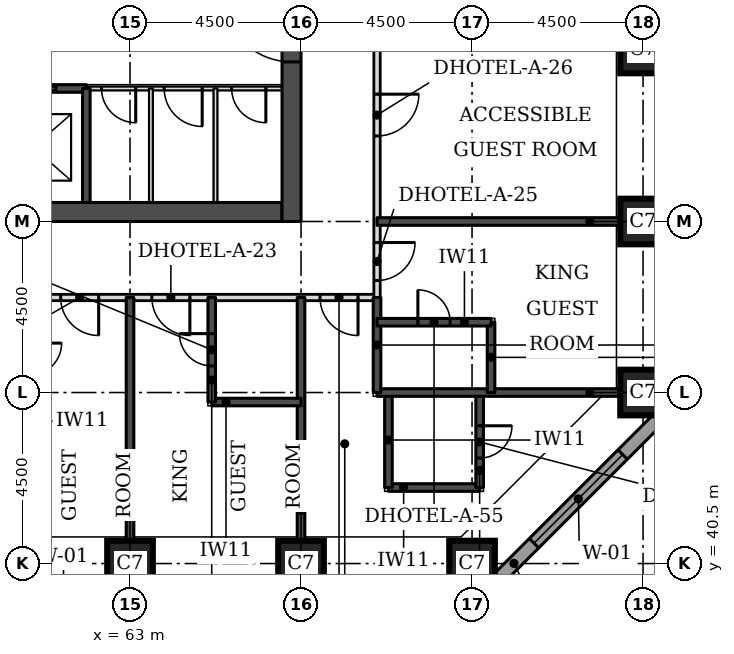
"""IFC4 building model, lengths in metres.
Left out: names, types, materials, properties, quantities, classifications, styles, units other than length and angle.
Written with IfcOpenShell. Run it as: python <this file> out.ifc"""

import sys

from ifc_helpers import new_model, si_unit, direction, frame, frame_2d, origin, origin_2d, place, context, subcontext, project, spatial, rectangle, extrude, element, fill, save


model = new_model("IFC4")
c1 = context("Model", 3, precision=1e-05, world=origin(), true_north=direction((0.0, 1.0)))
c2 = subcontext(c1, "Body", "Model", "MODEL_VIEW")
j1 = project(units=[si_unit("LENGTHUNIT", "METRE"), si_unit("PLANEANGLEUNIT", "RADIAN")], contexts=[c1])
p1 = place(None, origin())
s1 = spatial("IfcSite", under=j1, at=p1, CompositionType="ELEMENT")
p2 = place(p1, origin())
s2 = spatial("IfcBuilding", under=s1, at=p2, CompositionType="ELEMENT")
p3 = place(p2, frame((0.0, 0.0, 26.4)))
s3 = spatial("IfcBuildingStorey", under=s2, at=p3, CompositionType="ELEMENT", Elevation=26.4)
for number, where, z_axis, x_axis in (
    (1, (63.0, 40.5, 0.0), (0.0, 0.0, 1.0), (1.0, 0.0, 0.0)),
    (2, (67.5, 40.5, 0.0), (0.0, 0.0, 1.0), (1.0, 0.0, 0.0)),
    (3, (72.0, 40.5, 0.0), (0.0, 0.0, 1.0), (1.0, 0.0, 0.0)),
    (4, (76.5, 45.0, 0.0), (0.0, 0.0, 1.0), (1.0, 0.0, 0.0)),
    (5, (76.5, 49.5, 0.0), (0.0, 0.0, 1.0), (1.0, 0.0, 0.0)),
    (6, (76.5, 54.0, 0.0), (0.0, 0.0, 1.0), (1.0, 0.0, 0.0)),
):
    element("IfcColumn", number, at=place(p3, frame(where, z_axis=z_axis, x_axis=x_axis)), inside=s3, PredefinedType="COLUMN", context=c2, shape_type="SweptSolid", body=[
        extrude(rectangle(XDim=1.2, YDim=1.2, at=origin_2d()), origin(), (0.0, 0.0, 1.0), 3.3),
    ])
p4 = place(p3, frame((45.5, 49.75, 0.0), z_axis=(0.0, 0.0, 1.0), x_axis=(1.0, 0.0, 0.0)))
e7 = element("IfcWall", 7, at=p4, inside=s3, PredefinedType="SHEAR", context=c2, shape_type="SweptSolid", body=[
    extrude(rectangle(XDim=21.5, YDim=0.5, at=frame_2d((10.75, 0.0))), origin(), (0.0, 0.0, 1.0), 3.3),
])
p5 = place(p3, frame((67.25, 49.5, 0.0), z_axis=(0.0, 0.0, 1.0), x_axis=(0.0, 1.0, 0.0)))
e8 = element("IfcWall", 8, at=p5, inside=s3, PredefinedType="SHEAR", context=c2, shape_type="SweptSolid", body=[
    extrude(rectangle(XDim=22.5, YDim=0.5, at=frame_2d((11.25, 0.0))), origin(), (0.0, 0.0, 1.0), 3.3),
])
p6 = place(p5, frame((4.2, 0.0, 0.0)))
e9 = element("IfcOpeningElement", 9, at=p6, cuts=e8, PredefinedType="OPENING", context=c2, shape_type="SweptSolid", body=[
    extrude(rectangle(XDim=1.8, YDim=2.1, at=frame_2d((0.9, 1.05))), frame((0.0, 0.26, 0.0), z_axis=(0.0, -1.0, 0.0), x_axis=(1.0, 0.0, 0.0)), (0.0, 0.0, 1.0), 0.52),
])
p7 = place(p5, frame((6.9, 0.0, 0.0)))
e10 = element("IfcOpeningElement", 10, at=p7, cuts=e8, PredefinedType="OPENING", context=c2, shape_type="SweptSolid", body=[
    extrude(rectangle(XDim=1.1, YDim=2.1, at=frame_2d((0.55, 1.05))), frame((0.0, 0.26, 0.0), z_axis=(0.0, -1.0, 0.0), x_axis=(1.0, 0.0, 0.0)), (0.0, 0.0, 1.0), 0.52),
])
p8 = place(p5, frame((13.6, 0.0, 0.0)))
e11 = element("IfcOpeningElement", 11, at=p8, cuts=e8, PredefinedType="OPENING", context=c2, shape_type="SweptSolid", body=[
    extrude(rectangle(XDim=1.1, YDim=2.1, at=frame_2d((0.55, 1.05))), frame((0.0, 0.26, 0.0), z_axis=(0.0, -1.0, 0.0), x_axis=(1.0, 0.0, 0.0)), (0.0, 0.0, 1.0), 0.52),
])
p9 = place(p5, frame((16.5, 0.0, 0.0)))
e12 = element("IfcOpeningElement", 12, at=p9, cuts=e8, PredefinedType="OPENING", context=c2, shape_type="SweptSolid", body=[
    extrude(rectangle(XDim=1.8, YDim=2.1, at=frame_2d((0.9, 1.05))), frame((0.0, 0.26, 0.0), z_axis=(0.0, -1.0, 0.0), x_axis=(1.0, 0.0, 0.0)), (0.0, 0.0, 1.0), 0.52),
])
p10 = place(p3, frame((72.27, 39.674, 0.0), z_axis=(0.0, 0.0, 1.0), x_axis=(0.707106781187, 0.707106781187, 0.0)))
e13 = element("IfcWall", 13, at=p10, inside=s3, PredefinedType="STANDARD", context=c2, shape_type="SweptSolid", body=[
    extrude(rectangle(XDim=7.151, YDim=0.35, at=frame_2d((3.576, 0.0))), origin(), (0.0, 0.0, 1.0), 3.055),
])
p11 = place(p10, frame((1.926, 0.0, 0.8)))
e14 = element("IfcOpeningElement", 14, at=p11, cuts=e13, PredefinedType="OPENING", context=c2, shape_type="SweptSolid", body=[
    extrude(rectangle(XDim=3.3, YDim=1.5, at=frame_2d((1.65, 0.75))), frame((0.0, 0.185, 0.0), z_axis=(0.0, -1.0, 0.0), x_axis=(1.0, 0.0, 0.0)), (0.0, 0.0, 1.0), 0.37),
])
p12 = place(p3, frame((51.5, 47.5, 0.0), z_axis=(0.0, 0.0, 1.0), x_axis=(1.0, 0.0, 0.0)))
e15 = element("IfcWall", 15, at=p12, inside=s3, PredefinedType="PARTITIONING", context=c2, shape_type="SweptSolid", body=[
    extrude(rectangle(XDim=18.0, YDim=0.15, at=frame_2d((9.0, 0.0))), origin(), (0.0, 0.0, 1.0), 3.08),
])
p13 = place(p12, frame((12.075, 0.0, 0.0)))
e16 = element("IfcOpeningElement", 16, at=p13, cuts=e15, PredefinedType="OPENING", context=c2, shape_type="SweptSolid", body=[
    extrude(rectangle(XDim=1.0, YDim=2.1, at=frame_2d((0.5, 1.05))), frame((0.0, 0.085, 0.0), z_axis=(0.0, -1.0, 0.0), x_axis=(1.0, 0.0, 0.0)), (0.0, 0.0, 1.0), 0.17),
])
p14 = place(p12, frame((9.675, 0.0, 0.0)))
e17 = element("IfcOpeningElement", 17, at=p14, cuts=e15, PredefinedType="OPENING", context=c2, shape_type="SweptSolid", body=[
    extrude(rectangle(XDim=1.0, YDim=2.1, at=frame_2d((0.5, 1.05))), frame((0.0, 0.085, 0.0), z_axis=(0.0, -1.0, 0.0), x_axis=(1.0, 0.0, 0.0)), (0.0, 0.0, 1.0), 0.17),
])
p15 = place(p12, frame((16.5, 0.0, 0.0)))
e18 = element("IfcOpeningElement", 18, at=p15, cuts=e15, PredefinedType="OPENING", context=c2, shape_type="SweptSolid", body=[
    extrude(rectangle(XDim=1.0, YDim=2.1, at=frame_2d((0.5, 1.05))), frame((0.0, 0.085, 0.0), z_axis=(0.0, -1.0, 0.0), x_axis=(1.0, 0.0, 0.0)), (0.0, 0.0, 1.0), 0.17),
])
p16 = place(p3, frame((69.5, 47.5, 0.0), z_axis=(0.0, 0.0, 1.0), x_axis=(0.0, 1.0, 0.0)))
e19 = element("IfcWall", 19, at=p16, inside=s3, PredefinedType="PARTITIONING", context=c2, shape_type="SweptSolid", body=[
    extrude(rectangle(XDim=26.5, YDim=0.15, at=frame_2d((13.25, 0.0))), origin(), (0.0, 0.0, 1.0), 3.08),
])
p17 = place(p16, frame((22.525, 0.0, 0.0)))
e20 = element("IfcOpeningElement", 20, at=p17, cuts=e19, PredefinedType="OPENING", context=c2, shape_type="SweptSolid", body=[
    extrude(rectangle(XDim=1.0, YDim=2.1, at=frame_2d((0.5, 1.05))), frame((0.0, 0.085, 0.0), z_axis=(0.0, -1.0, 0.0), x_axis=(1.0, 0.0, 0.0)), (0.0, 0.0, 1.0), 0.17),
])
p18 = place(p16, frame((16.225, 0.0, 0.0)))
e21 = element("IfcOpeningElement", 21, at=p18, cuts=e19, PredefinedType="OPENING", context=c2, shape_type="SweptSolid", body=[
    extrude(rectangle(XDim=1.0, YDim=2.1, at=frame_2d((0.5, 1.05))), frame((0.0, 0.085, 0.0), z_axis=(0.0, -1.0, 0.0), x_axis=(1.0, 0.0, 0.0)), (0.0, 0.0, 1.0), 0.17),
])
p19 = place(p16, frame((4.25, 0.0, 0.0)))
e22 = element("IfcOpeningElement", 22, at=p19, cuts=e19, PredefinedType="OPENING", context=c2, shape_type="SweptSolid", body=[
    extrude(rectangle(XDim=1.1, YDim=2.1, at=frame_2d((0.55, 1.05))), frame((0.0, 0.085, 0.0), z_axis=(0.0, -1.0, 0.0), x_axis=(1.0, 0.0, 0.0)), (0.0, 0.0, 1.0), 0.17),
])
p20 = place(p16, frame((0.447, 0.0, 0.0)))
e23 = element("IfcOpeningElement", 23, at=p20, cuts=e19, PredefinedType="OPENING", context=c2, shape_type="SweptSolid", body=[
    extrude(rectangle(XDim=1.0, YDim=2.1, at=frame_2d((0.5, 1.05))), frame((0.0, 0.085, 0.0), z_axis=(0.0, -1.0, 0.0), x_axis=(1.0, 0.0, 0.0)), (0.0, 0.0, 1.0), 0.17),
])
for number, where, z_axis, x_axis in (
    (24, (63.0, 41.1, 0.0), (0.0, 0.0, 1.0), (0.0, 1.0, 0.0)),
    (25, (67.5, 41.1, 0.0), (0.0, 0.0, 1.0), (0.0, 1.0, 0.0)),
):
    element("IfcWall", number, at=place(p3, frame(where, z_axis=z_axis, x_axis=x_axis)), inside=s3, PredefinedType="SOLIDWALL", context=c2, shape_type="SweptSolid", body=[
        extrude(rectangle(XDim=6.4, YDim=0.2, at=frame_2d((3.2, 0.0))), origin(), (0.0, 0.0, 1.0), 3.08),
    ])
p21 = place(p3, frame((69.8, 42.5, 0.0), z_axis=(0.0, 0.0, 1.0), x_axis=(1.0, 0.0, 0.0)))
e26 = element("IfcWall", 26, at=p21, inside=s3, PredefinedType="SOLIDWALL", context=c2, shape_type="SweptSolid", body=[
    extrude(rectangle(XDim=2.4, YDim=0.2, at=frame_2d((1.2, 0.0))), origin(), (0.0, 0.0, 1.0), 3.08),
])
p22 = place(p3, frame((69.8, 42.5, 0.0), z_axis=(0.0, 0.0, 1.0), x_axis=(0.0, 1.0, 0.0)))
e27 = element("IfcWall", 27, at=p22, inside=s3, PredefinedType="SOLIDWALL", context=c2, shape_type="SweptSolid", body=[
    extrude(rectangle(XDim=2.5, YDim=0.2, at=frame_2d((1.25, 0.0))), origin(), (0.0, 0.0, 1.0), 3.08),
])
p23 = place(p3, frame((72.2, 42.5, 0.0), z_axis=(0.0, 0.0, 1.0), x_axis=(0.0, 1.0, 0.0)))
e28 = element("IfcWall", 28, at=p23, inside=s3, PredefinedType="SOLIDWALL", context=c2, shape_type="SweptSolid", body=[
    extrude(rectangle(XDim=2.5, YDim=0.2, at=frame_2d((1.25, 0.0))), origin(), (0.0, 0.0, 1.0), 3.08),
])
p24 = place(p23, frame((0.775, 0.0, 0.0)))
e29 = element("IfcOpeningElement", 29, at=p24, cuts=e28, PredefinedType="OPENING", context=c2, shape_type="SweptSolid", body=[
    extrude(rectangle(XDim=0.85, YDim=2.1, at=frame_2d((0.425, 1.05))), frame((0.0, 0.11, 0.0), z_axis=(0.0, -1.0, 0.0), x_axis=(1.0, 0.0, 0.0)), (0.0, 0.0, 1.0), 0.22),
])
p25 = place(p3, frame((65.15, 44.75, 0.0), z_axis=(0.0, 0.0, 1.0), x_axis=(1.0, 0.0, 0.0)))
e30 = element("IfcWall", 30, at=p25, inside=s3, PredefinedType="SOLIDWALL", context=c2, shape_type="SweptSolid", body=[
    extrude(rectangle(XDim=2.35, YDim=0.2, at=frame_2d((1.175, 0.0))), origin(), (0.0, 0.0, 1.0), 3.08),
])
p26 = place(p3, frame((65.15, 44.75, 0.0), z_axis=(0.0, 0.0, 1.0), x_axis=(0.0, 1.0, 0.0)))
e31 = element("IfcWall", 31, at=p26, inside=s3, PredefinedType="SOLIDWALL", context=c2, shape_type="SweptSolid", body=[
    extrude(rectangle(XDim=2.75, YDim=0.2, at=frame_2d((1.375, 0.0))), origin(), (0.0, 0.0, 1.0), 3.08),
])
p27 = place(p26, frame((0.95, 0.0, 0.0)))
e32 = element("IfcOpeningElement", 32, at=p27, cuts=e31, PredefinedType="OPENING", context=c2, shape_type="SweptSolid", body=[
    extrude(rectangle(XDim=0.85, YDim=2.1, at=frame_2d((0.425, 1.05))), frame((0.0, 0.11, 0.0), z_axis=(0.0, -1.0, 0.0), x_axis=(1.0, 0.0, 0.0)), (0.0, 0.0, 1.0), 0.22),
])
p28 = place(p3, frame((69.5, 45.0, 0.0), z_axis=(0.0, 0.0, 1.0), x_axis=(1.0, 0.0, 0.0)))
e33 = element("IfcWall", 33, at=p28, inside=s3, PredefinedType="SOLIDWALL", context=c2, shape_type="SweptSolid", body=[
    extrude(rectangle(XDim=6.4, YDim=0.2, at=frame_2d((3.2, 0.0))), origin(), (0.0, 0.0, 1.0), 3.08),
])
p29 = place(p3, frame((69.5, 45.0, 0.0), z_axis=(0.0, 0.0, 1.0), x_axis=(0.0, 1.0, 0.0)))
e34 = element("IfcWall", 34, at=p29, inside=s3, PredefinedType="SOLIDWALL", context=c2, shape_type="SweptSolid", body=[
    extrude(rectangle(XDim=2.5, YDim=0.2, at=frame_2d((1.25, 0.0))), origin(), (0.0, 0.0, 1.0), 3.08),
])
p30 = place(p3, frame((72.5, 45.0, 0.0), z_axis=(0.0, 0.0, 1.0), x_axis=(0.0, 1.0, 0.0)))
e35 = element("IfcWall", 35, at=p30, inside=s3, PredefinedType="SOLIDWALL", context=c2, shape_type="SweptSolid", body=[
    extrude(rectangle(XDim=1.85, YDim=0.2, at=frame_2d((0.925, 0.0))), origin(), (0.0, 0.0, 1.0), 3.08),
])
p31 = place(p3, frame((69.5, 46.85, 0.0), z_axis=(0.0, 0.0, 1.0), x_axis=(1.0, 0.0, 0.0)))
e36 = element("IfcWall", 36, at=p31, inside=s3, PredefinedType="SOLIDWALL", context=c2, shape_type="SweptSolid", body=[
    extrude(rectangle(XDim=3.0, YDim=0.2, at=frame_2d((1.5, 0.0))), origin(), (0.0, 0.0, 1.0), 3.08),
])
p32 = place(p31, frame((1.075, 0.0, 0.0)))
e37 = element("IfcOpeningElement", 37, at=p32, cuts=e36, PredefinedType="OPENING", context=c2, shape_type="SweptSolid", body=[
    extrude(rectangle(XDim=0.85, YDim=2.1, at=frame_2d((0.425, 1.05))), frame((0.0, 0.11, 0.0), z_axis=(0.0, -1.0, 0.0), x_axis=(1.0, 0.0, 0.0)), (0.0, 0.0, 1.0), 0.22),
])
p33 = place(p3, frame((69.5, 49.5, 0.0), z_axis=(0.0, 0.0, 1.0), x_axis=(1.0, 0.0, 0.0)))
e38 = element("IfcWall", 38, at=p33, inside=s3, PredefinedType="SOLIDWALL", context=c2, shape_type="SweptSolid", body=[
    extrude(rectangle(XDim=6.4, YDim=0.2, at=frame_2d((3.2, 0.0))), origin(), (0.0, 0.0, 1.0), 3.08),
])
p34 = place(p3, frame((61.85, 53.0, 0.0), z_axis=(0.0, 0.0, 1.0), x_axis=(1.0, 0.0, 0.0)))
e39 = element("IfcWall", 39, at=p34, inside=s3, PredefinedType="PARTITIONING", context=c2, shape_type="SweptSolid", body=[
    extrude(rectangle(XDim=5.15, YDim=0.1, at=frame_2d((2.575, 0.0))), origin(), (0.0, 0.0, 1.0), 3.08),
])
p35 = place(p34, frame((3.824, 0.0, 0.0)))
e40 = element("IfcOpeningElement", 40, at=p35, cuts=e39, PredefinedType="OPENING", context=c2, shape_type="SweptSolid", body=[
    extrude(rectangle(XDim=0.9, YDim=2.1, at=frame_2d((0.45, 1.05))), frame((0.0, 0.06, 0.0), z_axis=(0.0, -1.0, 0.0), x_axis=(1.0, 0.0, 0.0)), (0.0, 0.0, 1.0), 0.12),
])
p36 = place(p34, frame((2.049, 0.0, 0.0)))
e41 = element("IfcOpeningElement", 41, at=p36, cuts=e39, PredefinedType="OPENING", context=c2, shape_type="SweptSolid", body=[
    extrude(rectangle(XDim=1.0, YDim=2.1, at=frame_2d((0.5, 1.05))), frame((0.0, 0.06, 0.0), z_axis=(0.0, -1.0, 0.0), x_axis=(1.0, 0.0, 0.0)), (0.0, 0.0, 1.0), 0.12),
])
p37 = place(p34, frame((0.4, 0.0, 0.0)))
e42 = element("IfcOpeningElement", 42, at=p37, cuts=e39, PredefinedType="OPENING", context=c2, shape_type="SweptSolid", body=[
    extrude(rectangle(XDim=0.9, YDim=2.1, at=frame_2d((0.45, 1.05))), frame((0.0, 0.06, 0.0), z_axis=(0.0, -1.0, 0.0), x_axis=(1.0, 0.0, 0.0)), (0.0, 0.0, 1.0), 0.12),
])
p38 = place(p3, frame((50.65, 53.0, 0.0), z_axis=(0.0, 0.0, 1.0), x_axis=(1.0, 0.0, 0.0)))
e43 = element("IfcWall", 43, at=p38, inside=s3, PredefinedType="SOLIDWALL", context=c2, shape_type="SweptSolid", body=[
    extrude(rectangle(XDim=11.2, YDim=0.2, at=frame_2d((5.6, 0.0))), origin(), (0.0, 0.0, 1.0), 3.08),
])
p39 = place(p38, frame((0.8, 0.0, 0.0)))
e44 = element("IfcOpeningElement", 44, at=p39, cuts=e43, PredefinedType="OPENING", context=c2, shape_type="SweptSolid", body=[
    extrude(rectangle(XDim=1.2, YDim=2.1, at=frame_2d((0.6, 1.05))), frame((0.0, 0.11, 0.0), z_axis=(0.0, -1.0, 0.0), x_axis=(1.0, 0.0, 0.0)), (0.0, 0.0, 1.0), 0.22),
])
p40 = place(p38, frame((3.6, 0.0, 0.0)))
e45 = element("IfcOpeningElement", 45, at=p40, cuts=e43, PredefinedType="OPENING", context=c2, shape_type="SweptSolid", body=[
    extrude(rectangle(XDim=1.2, YDim=2.1, at=frame_2d((0.6, 1.05))), frame((0.0, 0.11, 0.0), z_axis=(0.0, -1.0, 0.0), x_axis=(1.0, 0.0, 0.0)), (0.0, 0.0, 1.0), 0.22),
])
p41 = place(p38, frame((6.4, 0.0, 0.0)))
e46 = element("IfcOpeningElement", 46, at=p41, cuts=e43, PredefinedType="OPENING", context=c2, shape_type="SweptSolid", body=[
    extrude(rectangle(XDim=1.2, YDim=2.1, at=frame_2d((0.6, 1.05))), frame((0.0, 0.11, 0.0), z_axis=(0.0, -1.0, 0.0), x_axis=(1.0, 0.0, 0.0)), (0.0, 0.0, 1.0), 0.22),
])
p42 = place(p38, frame((9.2, 0.0, 0.0)))
e47 = element("IfcOpeningElement", 47, at=p42, cuts=e43, PredefinedType="OPENING", context=c2, shape_type="SweptSolid", body=[
    extrude(rectangle(XDim=1.2, YDim=2.1, at=frame_2d((0.6, 1.05))), frame((0.0, 0.11, 0.0), z_axis=(0.0, -1.0, 0.0), x_axis=(1.0, 0.0, 0.0)), (0.0, 0.0, 1.0), 0.22),
])
p43 = place(p3, frame((61.85, 50.0, 0.0), z_axis=(0.0, 0.0, 1.0), x_axis=(0.0, 1.0, 0.0)))
e48 = element("IfcWall", 48, at=p43, inside=s3, PredefinedType="SOLIDWALL", context=c2, shape_type="SweptSolid", body=[
    extrude(rectangle(XDim=3.0, YDim=0.2, at=frame_2d((1.5, 0.0))), origin(), (0.0, 0.0, 1.0), 3.08),
])
for number, where, z_axis, x_axis in (
    (49, (63.55, 50.0, 0.0), (0.0, 0.0, 1.0), (0.0, 1.0, 0.0)),
    (50, (65.249, 50.0, 0.0), (0.0, 0.0, 1.0), (0.0, 1.0, 0.0)),
):
    element("IfcWall", number, at=place(p3, frame(where, z_axis=z_axis, x_axis=x_axis)), inside=s3, PredefinedType="PARTITIONING", context=c2, shape_type="SweptSolid", body=[
        extrude(rectangle(XDim=3.0, YDim=0.1, at=frame_2d((1.5, 0.0))), origin(), (0.0, 0.0, 1.0), 3.08),
    ])
p44 = place(p11, origin())
e51 = element("IfcWindow", 51, at=p44, inside=s3, PartitioningType="SINGLE_PANEL", PredefinedType="WINDOW", context=c2, shape_type="SweptSolid", body=[
    extrude(rectangle(XDim=3.3, YDim=1.5, at=frame_2d((1.65, 0.75))), frame((0.0, 0.085, 0.0), z_axis=(0.0, -1.0, 0.0), x_axis=(1.0, 0.0, 0.0)), (0.0, 0.0, 1.0), 0.06),
])
fill(e14, e51)
p45 = place(p19, frame((1.1, 0.0, 0.0), z_axis=(0.0, 0.0, 1.0), x_axis=(-1.0, 0.0, 0.0)))
e52 = element("IfcDoor", 52, at=p45, inside=s3, OperationType="SINGLE_SWING_LEFT", PredefinedType="DOOR", context=c2, shape_type="SweptSolid", body=[
    extrude(rectangle(XDim=1.1, YDim=2.1, at=frame_2d((0.55, 1.05))), frame((0.0, 0.025, 0.0), z_axis=(0.0, -1.0, 0.0), x_axis=(1.0, 0.0, 0.0)), (0.0, 0.0, 1.0), 0.05),
])
fill(e22, e52)
p46 = place(p20, frame((1.0, 0.0, 0.0), z_axis=(0.0, 0.0, 1.0), x_axis=(-1.0, 0.0, 0.0)))
e53 = element("IfcDoor", 53, at=p46, inside=s3, OperationType="SINGLE_SWING_LEFT", PredefinedType="DOOR", context=c2, shape_type="SweptSolid", body=[
    extrude(rectangle(XDim=1.0, YDim=2.1, at=frame_2d((0.5, 1.05))), frame((0.0, 0.025, 0.0), z_axis=(0.0, -1.0, 0.0), x_axis=(1.0, 0.0, 0.0)), (0.0, 0.0, 1.0), 0.05),
])
fill(e23, e53)
p47 = place(p32, origin())
e54 = element("IfcDoor", 54, at=p47, inside=s3, OperationType="SINGLE_SWING_LEFT", PredefinedType="DOOR", context=c2, shape_type="SweptSolid", body=[
    extrude(rectangle(XDim=0.85, YDim=2.1, at=frame_2d((0.425, 1.05))), frame((0.0, 0.025, 0.0), z_axis=(0.0, -1.0, 0.0), x_axis=(1.0, 0.0, 0.0)), (0.0, 0.0, 1.0), 0.05),
])
fill(e37, e54)
p48 = place(p13, frame((1.0, 0.0, 0.0), z_axis=(0.0, 0.0, 1.0), x_axis=(-1.0, 0.0, 0.0)))
e55 = element("IfcDoor", 55, at=p48, inside=s3, OperationType="SINGLE_SWING_LEFT", PredefinedType="DOOR", context=c2, shape_type="SweptSolid", body=[
    extrude(rectangle(XDim=1.0, YDim=2.1, at=frame_2d((0.5, 1.05))), frame((0.0, 0.025, 0.0), z_axis=(0.0, -1.0, 0.0), x_axis=(1.0, 0.0, 0.0)), (0.0, 0.0, 1.0), 0.05),
])
fill(e16, e55)
p49 = place(p27, origin())
e56 = element("IfcDoor", 56, at=p49, inside=s3, OperationType="SINGLE_SWING_RIGHT", PredefinedType="DOOR", context=c2, shape_type="SweptSolid", body=[
    extrude(rectangle(XDim=0.85, YDim=2.1, at=frame_2d((0.425, 1.05))), frame((0.0, 0.025, 0.0), z_axis=(0.0, -1.0, 0.0), x_axis=(1.0, 0.0, 0.0)), (0.0, 0.0, 1.0), 0.05),
])
fill(e32, e56)
p50 = place(p14, frame((1.0, 0.0, 0.0), z_axis=(0.0, 0.0, 1.0), x_axis=(-1.0, 0.0, 0.0)))
e57 = element("IfcDoor", 57, at=p50, inside=s3, OperationType="SINGLE_SWING_LEFT", PredefinedType="DOOR", context=c2, shape_type="SweptSolid", body=[
    extrude(rectangle(XDim=1.0, YDim=2.1, at=frame_2d((0.5, 1.05))), frame((0.0, 0.025, 0.0), z_axis=(0.0, -1.0, 0.0), x_axis=(1.0, 0.0, 0.0)), (0.0, 0.0, 1.0), 0.05),
])
fill(e17, e57)
p51 = place(p15, frame((1.0, 0.0, 0.0), z_axis=(0.0, 0.0, 1.0), x_axis=(-1.0, 0.0, 0.0)))
e58 = element("IfcDoor", 58, at=p51, inside=s3, OperationType="SINGLE_SWING_LEFT", PredefinedType="DOOR", context=c2, shape_type="SweptSolid", body=[
    extrude(rectangle(XDim=1.0, YDim=2.1, at=frame_2d((0.5, 1.05))), frame((0.0, 0.025, 0.0), z_axis=(0.0, -1.0, 0.0), x_axis=(1.0, 0.0, 0.0)), (0.0, 0.0, 1.0), 0.05),
])
fill(e18, e58)
p52 = place(p24, frame((0.85, 0.0, 0.0), z_axis=(0.0, 0.0, 1.0), x_axis=(-1.0, 0.0, 0.0)))
e59 = element("IfcDoor", 59, at=p52, inside=s3, OperationType="SINGLE_SWING_LEFT", PredefinedType="DOOR", context=c2, shape_type="SweptSolid", body=[
    extrude(rectangle(XDim=0.85, YDim=2.1, at=frame_2d((0.425, 1.05))), frame((0.0, 0.025, 0.0), z_axis=(0.0, -1.0, 0.0), x_axis=(1.0, 0.0, 0.0)), (0.0, 0.0, 1.0), 0.05),
])
fill(e29, e59)
p53 = place(p42, origin())
e60 = element("IfcDoor", 60, at=p53, inside=s3, OperationType="DOUBLE_DOOR_SLIDING", PredefinedType="DOOR", context=c2, shape_type="SweptSolid", body=[
    extrude(rectangle(XDim=1.2, YDim=2.1, at=frame_2d((0.6, 1.05))), frame((0.0, 0.025, 0.0), z_axis=(0.0, -1.0, 0.0), x_axis=(1.0, 0.0, 0.0)), (0.0, 0.0, 1.0), 0.05),
])
fill(e47, e60)
p54 = place(p6, origin())
e61 = element("IfcDoor", 61, at=p54, inside=s3, OperationType="SINGLE_SWING_RIGHT", PredefinedType="DOOR", context=c2, shape_type="SweptSolid", body=[
    extrude(rectangle(XDim=1.8, YDim=2.1, at=frame_2d((0.9, 1.05))), frame((0.0, 0.025, 0.0), z_axis=(0.0, -1.0, 0.0), x_axis=(1.0, 0.0, 0.0)), (0.0, 0.0, 1.0), 0.05),
])
fill(e9, e61)
p55 = place(p35, frame((0.9, 0.0, 0.0), z_axis=(0.0, 0.0, 1.0), x_axis=(-1.0, 0.0, 0.0)))
e62 = element("IfcDoor", 62, at=p55, inside=s3, OperationType="SINGLE_SWING_LEFT", PredefinedType="DOOR", context=c2, shape_type="SweptSolid", body=[
    extrude(rectangle(XDim=0.9, YDim=2.1, at=frame_2d((0.45, 1.05))), frame((0.0, 0.025, 0.0), z_axis=(0.0, -1.0, 0.0), x_axis=(1.0, 0.0, 0.0)), (0.0, 0.0, 1.0), 0.05),
])
fill(e40, e62)
p56 = place(p36, frame((1.0, 0.0, 0.0), z_axis=(0.0, 0.0, 1.0), x_axis=(-1.0, 0.0, 0.0)))
e63 = element("IfcDoor", 63, at=p56, inside=s3, OperationType="SINGLE_SWING_LEFT", PredefinedType="DOOR", context=c2, shape_type="SweptSolid", body=[
    extrude(rectangle(XDim=1.0, YDim=2.1, at=frame_2d((0.5, 1.05))), frame((0.0, 0.025, 0.0), z_axis=(0.0, -1.0, 0.0), x_axis=(1.0, 0.0, 0.0)), (0.0, 0.0, 1.0), 0.05),
])
fill(e41, e63)
p57 = place(p37, frame((0.9, 0.0, 0.0), z_axis=(0.0, 0.0, 1.0), x_axis=(-1.0, 0.0, 0.0)))
e64 = element("IfcDoor", 64, at=p57, inside=s3, OperationType="SINGLE_SWING_LEFT", PredefinedType="DOOR", context=c2, shape_type="SweptSolid", body=[
    extrude(rectangle(XDim=0.9, YDim=2.1, at=frame_2d((0.45, 1.05))), frame((0.0, 0.025, 0.0), z_axis=(0.0, -1.0, 0.0), x_axis=(1.0, 0.0, 0.0)), (0.0, 0.0, 1.0), 0.05),
])
fill(e42, e64)
save(model, sys.argv[1])
